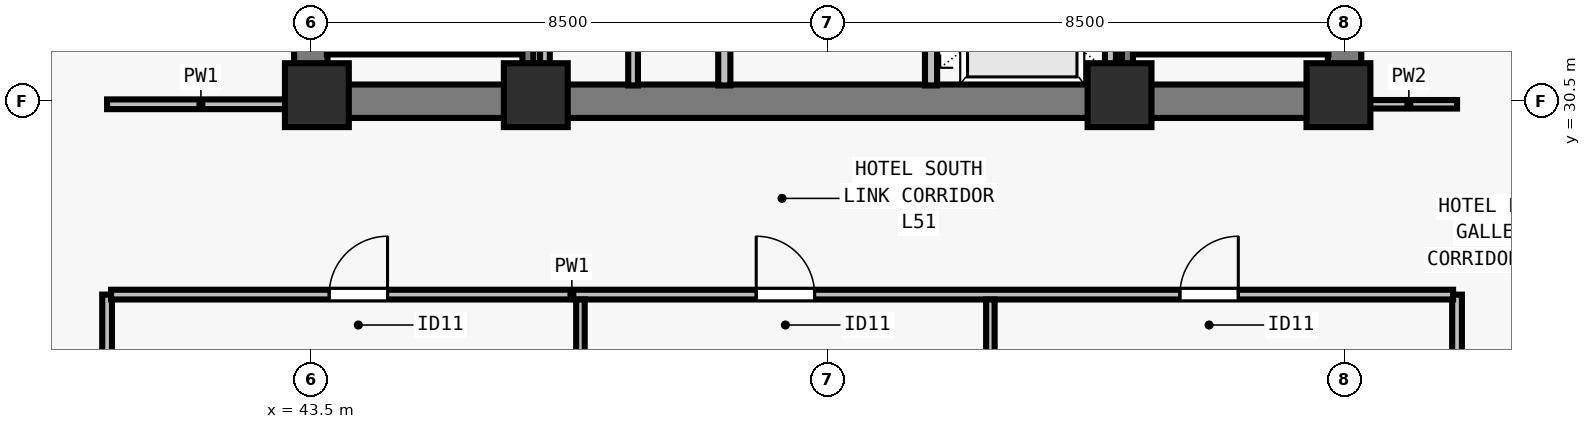
"""IFC4 building model, lengths in metres.
Left out: names, types, materials, properties, quantities, classifications, styles, units other than length and angle.
Written with IfcOpenShell. Run it as: python <this file> out.ifc"""

import sys

from ifc_helpers import new_model, si_unit, direction, frame, frame_2d, origin, origin_2d, place, context, subcontext, project, spatial, rectangle, extrude, element, fill, save


model = new_model("IFC4")
c1 = context("Model", 3, precision=1e-05, world=origin(), true_north=direction((0.0, 1.0)))
c2 = subcontext(c1, "Body", "Model", "MODEL_VIEW")
j1 = project(units=[si_unit("LENGTHUNIT", "METRE"), si_unit("PLANEANGLEUNIT", "RADIAN")], contexts=[c1])
p1 = place(None, origin())
s1 = spatial("IfcSite", under=j1, at=p1, CompositionType="ELEMENT")
p2 = place(p1, origin())
s2 = spatial("IfcBuilding", under=s1, at=p2, CompositionType="ELEMENT")
p3 = place(p2, frame((0.0, 0.0, 186.5)))
s3 = spatial("IfcBuildingStorey", under=s2, at=p3, CompositionType="ELEMENT", Elevation=186.5)
for number, where, z_axis, x_axis in (
    (1, (43.6, 30.6, 0.0), (0.0, 0.0, 1.0), (1.0, 0.0, 0.0)),
    (2, (47.2, 30.6, 0.0), (0.0, 0.0, 1.0), (1.0, 0.0, 0.0)),
    (3, (56.8, 30.6, 0.0), (0.0, 0.0, 1.0), (1.0, 0.0, 0.0)),
    (4, (60.4, 30.6, 0.0), (0.0, 0.0, 1.0), (1.0, 0.0, 0.0)),
):
    element("IfcColumn", number, at=place(p3, frame(where, z_axis=z_axis, x_axis=x_axis)), inside=s3, PredefinedType="COLUMN", context=c2, shape_type="SweptSolid", body=[
        extrude(rectangle(XDim=1.05, YDim=1.05, at=origin_2d()), origin(), (0.0, 0.0, 1.0), 3.5),
    ])
p4 = place(p3, frame((43.225, 30.5, 0.0), z_axis=(0.0, 0.0, 1.0), x_axis=(1.0, 0.0, 0.0)))
e5 = element("IfcWall", 5, at=p4, inside=s3, PredefinedType="SHEAR", context=c2, shape_type="SweptSolid", body=[
    extrude(rectangle(XDim=17.55, YDim=0.55, at=frame_2d((8.775, 0.0))), origin(), (0.0, 0.0, 1.0), 3.28),
])
for number, where, z_axis, x_axis in (
    (6, (43.5, 30.765, 0.0), (0.0, 0.0, 1.0), (0.0, 1.0, 0.0)),
    (7, (60.5, 30.765, 0.0), (0.0, 0.0, 1.0), (0.0, 1.0, 0.0)),
):
    element("IfcWall", number, at=place(p3, frame(where, z_axis=z_axis, x_axis=x_axis)), inside=s3, PredefinedType="SHEAR", context=c2, shape_type="SweptSolid", body=[
        extrude(rectangle(XDim=7.985, YDim=0.55, at=frame_2d((3.993, 0.0))), origin(), (0.0, 0.0, 1.0), 3.28),
    ])
p5 = place(p3, frame((50.3, 30.76, 0.0), z_axis=(0.0, 0.0, 1.0), x_axis=(0.0, 1.0, 0.0)))
e8 = element("IfcWall", 8, at=p5, inside=s3, PredefinedType="SOLIDWALL", context=c2, shape_type="SweptSolid", body=[
    extrude(rectangle(XDim=7.855, YDim=0.2, at=frame_2d((3.927, 0.0))), origin(), (0.0, 0.0, 1.0), 3.28),
])
p6 = place(p5, frame((2.09, 0.0, 0.0)))
e9 = element("IfcOpeningElement", 9, at=p6, cuts=e8, PredefinedType="OPENING", context=c2, shape_type="SweptSolid", body=[
    extrude(rectangle(XDim=0.95, YDim=2.12, at=frame_2d((0.475, 1.06))), frame((0.0, 0.11, 0.0), z_axis=(0.0, -1.0, 0.0), x_axis=(1.0, 0.0, 0.0)), (0.0, 0.0, 1.0), 0.22),
])
p7 = place(p3, frame((53.7, 30.76, 0.0), z_axis=(0.0, 0.0, 1.0), x_axis=(0.0, 1.0, 0.0)))
e10 = element("IfcWall", 10, at=p7, inside=s3, PredefinedType="SOLIDWALL", context=c2, shape_type="SweptSolid", body=[
    extrude(rectangle(XDim=7.855, YDim=0.2, at=frame_2d((3.927, 0.0))), origin(), (0.0, 0.0, 1.0), 3.28),
])
p8 = place(p7, frame((0.79, 0.0, 0.0)))
e11 = element("IfcOpeningElement", 11, at=p8, cuts=e10, PredefinedType="OPENING", context=c2, shape_type="SweptSolid", body=[
    extrude(rectangle(XDim=1.1, YDim=2.2, at=frame_2d((0.55, 1.1))), frame((0.0, 0.11, 0.0), z_axis=(0.0, -1.0, 0.0), x_axis=(1.0, 0.0, 0.0)), (0.0, 0.0, 1.0), 0.22),
])
p9 = place(p7, frame((3.49, 0.0, 0.0)))
e12 = element("IfcOpeningElement", 12, at=p9, cuts=e10, PredefinedType="OPENING", context=c2, shape_type="SweptSolid", body=[
    extrude(rectangle(XDim=1.1, YDim=2.2, at=frame_2d((0.55, 1.1))), frame((0.0, 0.11, 0.0), z_axis=(0.0, -1.0, 0.0), x_axis=(1.0, 0.0, 0.0)), (0.0, 0.0, 1.0), 0.22),
])
p10 = place(p7, frame((6.19, 0.0, 0.0)))
e13 = element("IfcOpeningElement", 13, at=p10, cuts=e10, PredefinedType="OPENING", context=c2, shape_type="SweptSolid", body=[
    extrude(rectangle(XDim=1.1, YDim=2.2, at=frame_2d((0.55, 1.1))), frame((0.0, 0.11, 0.0), z_axis=(0.0, -1.0, 0.0), x_axis=(1.0, 0.0, 0.0)), (0.0, 0.0, 1.0), 0.22),
])
p11 = place(p3, frame((47.35, 30.76, 0.0), z_axis=(0.0, 0.0, 1.0), x_axis=(0.0, 1.0, 0.0)))
e14 = element("IfcWall", 14, at=p11, inside=s3, PredefinedType="PARTITIONING", context=c2, shape_type="SweptSolid", body=[
    extrude(rectangle(XDim=7.855, YDim=0.16, at=frame_2d((3.927, 0.0))), origin(), (0.0, 0.0, 1.0), 3.28),
])
p12 = place(p3, frame((48.8, 30.76, 0.0), z_axis=(0.0, 0.0, 1.0), x_axis=(0.0, 1.0, 0.0)))
e15 = element("IfcWall", 15, at=p12, inside=s3, PredefinedType="PARTITIONING", context=c2, shape_type="SweptSolid", body=[
    extrude(rectangle(XDim=7.855, YDim=0.16, at=frame_2d((3.927, 0.0))), origin(), (0.0, 0.0, 1.0), 3.28),
])
p13 = place(p12, frame((3.49, 0.0, 0.0)))
e16 = element("IfcOpeningElement", 16, at=p13, cuts=e15, PredefinedType="OPENING", context=c2, shape_type="SweptSolid", body=[
    extrude(rectangle(XDim=0.85, YDim=2.12, at=frame_2d((0.425, 1.06))), frame((0.0, 0.09, 0.0), z_axis=(0.0, -1.0, 0.0), x_axis=(1.0, 0.0, 0.0)), (0.0, 0.0, 1.0), 0.18),
])
p14 = place(p3, frame((56.65, 30.76, 0.0), z_axis=(0.0, 0.0, 1.0), x_axis=(0.0, 1.0, 0.0)))
e17 = element("IfcWall", 17, at=p14, inside=s3, PredefinedType="SOLIDWALL", context=c2, shape_type="SweptSolid", body=[
    extrude(rectangle(XDim=7.855, YDim=0.18, at=frame_2d((3.927, 0.0))), origin(), (0.0, 0.0, 1.0), 3.28),
])
p15 = place(p3, frame((40.15, 15.325, 0.0), z_axis=(0.0, 0.0, 1.0), x_axis=(0.0, 1.0, 0.0)))
e18 = element("IfcWall", 18, at=p15, inside=s3, PredefinedType="PARTITIONING", context=c2, shape_type="SweptSolid", body=[
    extrude(rectangle(XDim=11.995, YDim=0.16, at=frame_2d((5.998, 0.0))), origin(), (0.0, 0.0, 1.0), 2.555),
])
p16 = place(p3, frame((40.15, 30.45, 0.0), z_axis=(0.0, 0.0, 1.0), x_axis=(1.0, 0.0, 0.0)))
e19 = element("IfcWall", 19, at=p16, inside=s3, PredefinedType="PARTITIONING", context=c2, shape_type="SweptSolid", body=[
    extrude(rectangle(XDim=3.085, YDim=0.16, at=frame_2d((1.542, 0.0))), origin(), (0.0, 0.0, 1.0), 3.28),
])
p17 = place(p3, frame((62.35, 15.325, 0.0), z_axis=(0.0, 0.0, 1.0), x_axis=(0.0, 1.0, 0.0)))
e20 = element("IfcWall", 20, at=p17, inside=s3, PredefinedType="PARTITIONING", context=c2, shape_type="SweptSolid", body=[
    extrude(rectangle(XDim=11.995, YDim=0.16, at=frame_2d((5.998, 0.0))), origin(), (0.0, 0.0, 1.0), 3.28),
])
p18 = place(p3, frame((60.765, 30.45, 0.0), z_axis=(0.0, 0.0, 1.0), x_axis=(1.0, 0.0, 0.0)))
e21 = element("IfcWall", 21, at=p18, inside=s3, PredefinedType="PARTITIONING", context=c2, shape_type="SweptSolid", body=[
    extrude(rectangle(XDim=1.585, YDim=0.14, at=frame_2d((0.792, 0.0))), origin(), (0.0, 0.0, 1.0), 3.28),
])
p19 = place(p3, frame((40.215, 27.32, 0.0), z_axis=(0.0, 0.0, 1.0), x_axis=(1.0, 0.0, 0.0)))
e22 = element("IfcWall", 22, at=p19, inside=s3, PredefinedType="PARTITIONING", context=c2, shape_type="SweptSolid", body=[
    extrude(rectangle(XDim=22.07, YDim=0.16, at=frame_2d((11.035, 0.0))), origin(), (0.0, 0.0, 1.0), 3.28),
])
p20 = place(p19, frame((3.587, 0.0, 0.0)))
e23 = element("IfcOpeningElement", 23, at=p20, cuts=e22, PredefinedType="OPENING", context=c2, shape_type="SweptSolid", body=[
    extrude(rectangle(XDim=0.96, YDim=2.12, at=frame_2d((0.48, 1.06))), frame((0.0, 0.09, 0.0), z_axis=(0.0, -1.0, 0.0), x_axis=(1.0, 0.0, 0.0)), (0.0, 0.0, 1.0), 0.18),
])
p21 = place(p19, frame((10.61, 0.0, 0.0)))
e24 = element("IfcOpeningElement", 24, at=p21, cuts=e22, PredefinedType="OPENING", context=c2, shape_type="SweptSolid", body=[
    extrude(rectangle(XDim=0.96, YDim=2.12, at=frame_2d((0.48, 1.06))), frame((0.0, 0.09, 0.0), z_axis=(0.0, -1.0, 0.0), x_axis=(1.0, 0.0, 0.0)), (0.0, 0.0, 1.0), 0.18),
])
p22 = place(p19, frame((17.578, 0.0, 0.0)))
e25 = element("IfcOpeningElement", 25, at=p22, cuts=e22, PredefinedType="OPENING", context=c2, shape_type="SweptSolid", body=[
    extrude(rectangle(XDim=0.96, YDim=2.12, at=frame_2d((0.48, 1.06))), frame((0.0, 0.09, 0.0), z_axis=(0.0, -1.0, 0.0), x_axis=(1.0, 0.0, 0.0)), (0.0, 0.0, 1.0), 0.18),
])
p23 = place(p3, frame((47.934, 15.42, 0.0), z_axis=(0.0, 0.0, 1.0), x_axis=(0.0, 1.0, 0.0)))
e26 = element("IfcWall", 26, at=p23, inside=s3, PredefinedType="PARTITIONING", context=c2, shape_type="SweptSolid", body=[
    extrude(rectangle(XDim=11.82, YDim=0.14, at=frame_2d((5.91, 0.0))), origin(), (0.0, 0.0, 1.0), 2.896),
])
p24 = place(p3, frame((54.676, 15.42, 0.0), z_axis=(0.0, 0.0, 1.0), x_axis=(0.0, 1.0, 0.0)))
e27 = element("IfcWall", 27, at=p24, inside=s3, PredefinedType="PARTITIONING", context=c2, shape_type="SweptSolid", body=[
    extrude(rectangle(XDim=11.82, YDim=0.14, at=frame_2d((5.91, 0.0))), origin(), (0.0, 0.0, 1.0), 3.28),
])
p25 = place(p3, frame((43.765, 31.36, 0.0), z_axis=(0.0, 0.0, 1.0), x_axis=(1.0, 0.0, 0.0)))
e28 = element("IfcWall", 28, at=p25, inside=s3, PredefinedType="SOLIDWALL", context=c2, shape_type="SweptSolid", body=[
    extrude(rectangle(XDim=3.23, YDim=0.18, at=frame_2d((1.615, 0.0))), origin(), (0.0, 0.0, 1.0), 3.28),
])
p26 = place(p3, frame((47.07, 38.78, 0.0), z_axis=(0.0, 0.0, 1.0), x_axis=(0.0, -1.0, 0.0)))
e29 = element("IfcWall", 29, at=p26, inside=s3, PredefinedType="SOLIDWALL", context=c2, shape_type="SweptSolid", body=[
    extrude(rectangle(XDim=8.017, YDim=0.18, at=frame_2d((4.009, 0.0))), origin(), (0.0, 0.0, 1.0), 3.28),
])
p27 = place(p3, frame((57.005, 31.36, 0.0), z_axis=(0.0, 0.0, 1.0), x_axis=(1.0, 0.0, 0.0)))
e30 = element("IfcWall", 30, at=p27, inside=s3, PredefinedType="SOLIDWALL", context=c2, shape_type="SweptSolid", body=[
    extrude(rectangle(XDim=3.23, YDim=0.18, at=frame_2d((1.615, 0.0))), origin(), (0.0, 0.0, 1.0), 3.28),
])
p28 = place(p3, frame((56.93, 38.78, 0.0), z_axis=(0.0, 0.0, 1.0), x_axis=(0.0, -1.0, 0.0)))
e31 = element("IfcWall", 31, at=p28, inside=s3, PredefinedType="SOLIDWALL", context=c2, shape_type="SweptSolid", body=[
    extrude(rectangle(XDim=8.017, YDim=0.18, at=frame_2d((4.009, 0.0))), origin(), (0.0, 0.0, 1.0), 3.28),
])
p29 = place(p20, origin())
e32 = element("IfcDoor", 32, at=p29, inside=s3, OperationType="SINGLE_SWING_RIGHT", PredefinedType="DOOR", context=c2, shape_type="SweptSolid", body=[
    extrude(rectangle(XDim=0.96, YDim=2.12, at=frame_2d((0.48, 1.06))), frame((0.0, 0.025, 0.0), z_axis=(0.0, -1.0, 0.0), x_axis=(1.0, 0.0, 0.0)), (0.0, 0.0, 1.0), 0.05),
])
fill(e23, e32)
p30 = place(p21, origin())
e33 = element("IfcDoor", 33, at=p30, inside=s3, OperationType="SINGLE_SWING_LEFT", PredefinedType="DOOR", context=c2, shape_type="SweptSolid", body=[
    extrude(rectangle(XDim=0.96, YDim=2.12, at=frame_2d((0.48, 1.06))), frame((0.0, 0.025, 0.0), z_axis=(0.0, -1.0, 0.0), x_axis=(1.0, 0.0, 0.0)), (0.0, 0.0, 1.0), 0.05),
])
fill(e24, e33)
p31 = place(p22, origin())
e34 = element("IfcDoor", 34, at=p31, inside=s3, OperationType="SINGLE_SWING_RIGHT", PredefinedType="DOOR", context=c2, shape_type="SweptSolid", body=[
    extrude(rectangle(XDim=0.96, YDim=2.12, at=frame_2d((0.48, 1.06))), frame((0.0, 0.025, 0.0), z_axis=(0.0, -1.0, 0.0), x_axis=(1.0, 0.0, 0.0)), (0.0, 0.0, 1.0), 0.05),
])
fill(e25, e34)
save(model, sys.argv[1])
